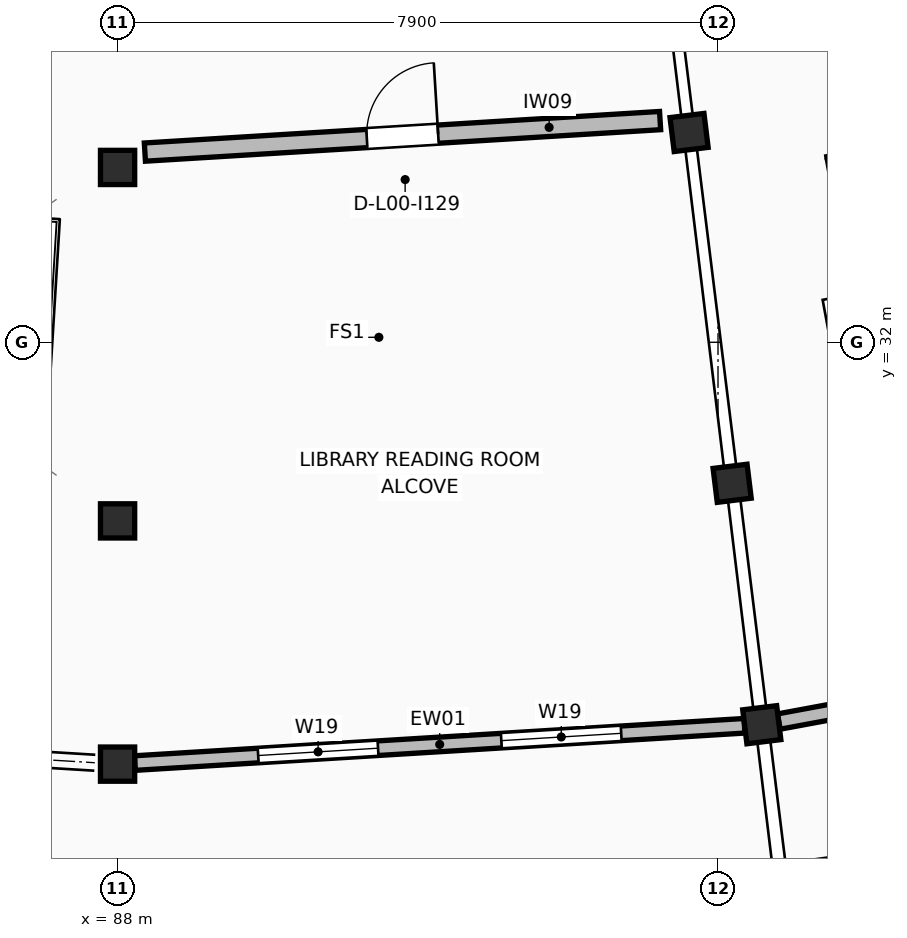
"""IFC4 building model, lengths in metres.
Left out: names, types, materials, properties, quantities, classifications, styles, units other than length and angle.
Written with IfcOpenShell. Run it as: python <this file> out.ifc"""

import sys

from ifc_helpers import new_model, si_unit, direction, frame, frame_2d, origin, origin_2d, place, context, subcontext, project, spatial, rectangle, extrude, element, fill, save


model = new_model("IFC4")
c1 = context("Model", 3, precision=1e-05, world=origin(), true_north=direction((0.0, 1.0)))
c2 = subcontext(c1, "Body", "Model", "MODEL_VIEW")
j1 = project(units=[si_unit("LENGTHUNIT", "METRE"), si_unit("PLANEANGLEUNIT", "RADIAN")], contexts=[c1])
p1 = place(None, origin())
s1 = spatial("IfcSite", under=j1, at=p1, CompositionType="ELEMENT")
p2 = place(p1, origin())
s2 = spatial("IfcBuilding", under=s1, at=p2, CompositionType="ELEMENT")
p3 = place(p2, origin())
s3 = spatial("IfcBuildingStorey", under=s2, at=p3, CompositionType="ELEMENT", Elevation=0.0)
for number, where, z_axis, x_axis in (
    (1, (88.0, 34.3, 0.0), (0.0, 0.0, 1.0), (0.0, -1.0, 0.0)),
    (2, (88.0, 29.65, 0.0), (0.0, 0.0, 1.0), (0.0, -1.0, 0.0)),
    (3, (88.0, 26.45, 0.0), (0.0, 0.0, 1.0), (0.0, -1.0, 0.0)),
    (4, (95.519, 34.76, 0.0), (0.0, 0.0, 1.0), (0.122, -0.993, 0.0)),
    (5, (96.086, 30.145, 0.0), (0.0, 0.0, 1.0), (0.122, -0.993, 0.0)),
    (6, (96.476, 26.969, 0.0), (0.0, 0.0, 1.0), (0.122, -0.993, 0.0)),
):
    element("IfcColumn", number, at=place(p3, frame(where, z_axis=z_axis, x_axis=x_axis)), inside=s3, PredefinedType="COLUMN", context=c2, shape_type="SweptSolid", body=[
        extrude(rectangle(XDim=0.45, YDim=0.45, at=origin_2d()), origin(), (0.0, 0.0, 1.0), 4.42),
    ])
p4 = place(p3, frame((88.228, 26.464, 0.0), z_axis=(0.0, 0.0, 1.0), x_axis=(0.998133755509, 0.061065588622, 0.0)))
e7 = element("IfcWall", 7, at=p4, inside=s3, PredefinedType="STANDARD", context=c2, shape_type="SweptSolid", body=[
    extrude(rectangle(XDim=8.036, YDim=0.192, at=frame_2d((4.018, 0.0))), origin(), (0.0, 0.0, 1.0), 3.4),
])
p5 = place(p4, frame((1.625, 0.0, 0.95)))
e8 = element("IfcOpeningElement", 8, at=p5, cuts=e7, PredefinedType="OPENING", context=c2, shape_type="SweptSolid", body=[
    extrude(rectangle(XDim=1.58, YDim=1.45, at=frame_2d((0.79, 0.725))), frame((0.0, 0.106, 0.0), z_axis=(0.0, -1.0, 0.0), x_axis=(1.0, 0.0, 0.0)), (0.0, 0.0, 1.0), 0.212),
])
p6 = place(p4, frame((4.831, 0.0, 0.95)))
e9 = element("IfcOpeningElement", 9, at=p6, cuts=e7, PredefinedType="OPENING", context=c2, shape_type="SweptSolid", body=[
    extrude(rectangle(XDim=1.58, YDim=1.45, at=frame_2d((0.79, 0.725))), frame((0.0, 0.106, 0.0), z_axis=(0.0, -1.0, 0.0), x_axis=(1.0, 0.0, 0.0)), (0.0, 0.0, 1.0), 0.212),
])
p7 = place(p3, frame((96.7, 27.01, 0.0), z_axis=(0.0, 0.0, 1.0), x_axis=(0.983256610621, 0.182226336377, 0.0)))
e10 = element("IfcWall", 10, at=p7, inside=s3, PredefinedType="STANDARD", context=c2, shape_type="SweptSolid", body=[
    extrude(rectangle(XDim=8.036, YDim=0.204, at=frame_2d((4.018, 0.0))), origin(), (0.0, 0.0, 1.0), 3.4),
])
p8 = place(p7, frame((3.143, 0.0, 0.0)))
e11 = element("IfcOpeningElement", 11, at=p8, cuts=e10, PredefinedType="OPENING", context=c2, shape_type="SweptSolid", body=[
    extrude(rectangle(XDim=1.75, YDim=2.25, at=frame_2d((0.875, 1.125))), frame((0.0, 0.112, 0.0), z_axis=(0.0, -1.0, 0.0), x_axis=(1.0, 0.0, 0.0)), (0.0, 0.0, 1.0), 0.224),
])
p9 = place(p3, frame((88.359, 34.502, 0.0), z_axis=(0.0, 0.0, 1.0), x_axis=(0.998135326973, 0.061039897184, 0.0)))
e12 = element("IfcWall", 12, at=p9, inside=s3, PredefinedType="STANDARD", context=c2, shape_type="SweptSolid", body=[
    extrude(rectangle(XDim=6.792, YDim=0.24, at=frame_2d((3.396, 0.0))), origin(), (0.0, 0.0, 1.0), 3.38),
])
p10 = place(p9, frame((2.926, 0.0, 0.0)))
e13 = element("IfcOpeningElement", 13, at=p10, cuts=e12, PredefinedType="OPENING", context=c2, shape_type="SweptSolid", body=[
    extrude(rectangle(XDim=0.94, YDim=2.12, at=frame_2d((0.47, 1.06))), frame((0.0, 0.13, 0.0), z_axis=(0.0, -1.0, 0.0), x_axis=(1.0, 0.0, 0.0)), (0.0, 0.0, 1.0), 0.26),
])
p11 = place(p5, origin())
e14 = element("IfcWindow", 14, at=p11, inside=s3, PartitioningType="SINGLE_PANEL", PredefinedType="WINDOW", context=c2, shape_type="SweptSolid", body=[
    extrude(rectangle(XDim=1.58, YDim=1.45, at=frame_2d((0.79, 0.725))), frame((0.0, 0.03, 0.0), z_axis=(0.0, -1.0, 0.0), x_axis=(1.0, 0.0, 0.0)), (0.0, 0.0, 1.0), 0.06),
])
fill(e8, e14)
p12 = place(p6, origin())
e15 = element("IfcWindow", 15, at=p12, inside=s3, PartitioningType="SINGLE_PANEL", PredefinedType="WINDOW", context=c2, shape_type="SweptSolid", body=[
    extrude(rectangle(XDim=1.58, YDim=1.45, at=frame_2d((0.79, 0.725))), frame((0.0, 0.03, 0.0), z_axis=(0.0, -1.0, 0.0), x_axis=(1.0, 0.0, 0.0)), (0.0, 0.0, 1.0), 0.06),
])
fill(e9, e15)
p13 = place(p10, origin())
e16 = element("IfcDoor", 16, at=p13, inside=s3, OperationType="SINGLE_SWING_RIGHT", PredefinedType="DOOR", context=c2, shape_type="SweptSolid", body=[
    extrude(rectangle(XDim=0.94, YDim=2.12, at=frame_2d((0.47, 1.06))), frame((0.0, 0.025, 0.0), z_axis=(0.0, -1.0, 0.0), x_axis=(1.0, 0.0, 0.0)), (0.0, 0.0, 1.0), 0.05),
])
fill(e13, e16)
save(model, sys.argv[1])
